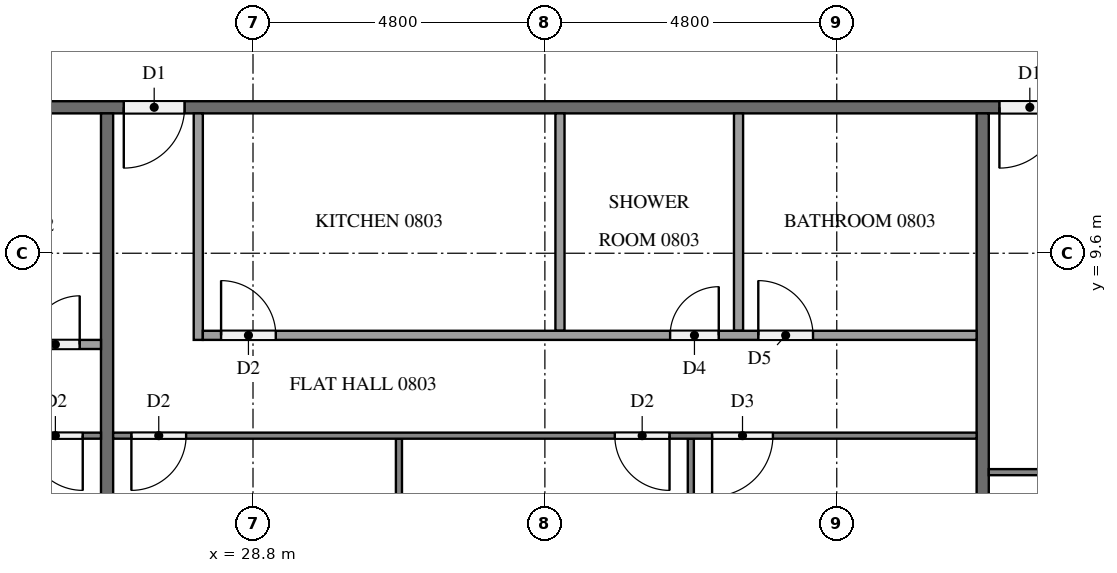
"""IFC4 building model, lengths in metres.
Left out: names, types, materials, properties, quantities, classifications, styles, units other than length and angle.
Written with IfcOpenShell. Run it as: python <this file> out.ifc"""

import sys

from ifc_helpers import new_model, si_unit, direction, frame, frame_2d, origin, place, context, subcontext, project, spatial, rectangle, extrude, element, fill, save


model = new_model("IFC4")
c1 = context("Model", 3, precision=1e-05, world=origin(), true_north=direction((0.0, 1.0)))
c2 = subcontext(c1, "Body", "Model", "MODEL_VIEW")
j1 = project(units=[si_unit("LENGTHUNIT", "METRE"), si_unit("PLANEANGLEUNIT", "RADIAN")], contexts=[c1])
p1 = place(None, origin())
s1 = spatial("IfcSite", under=j1, at=p1, CompositionType="ELEMENT")
p2 = place(p1, origin())
s2 = spatial("IfcBuilding", under=s1, at=p2, CompositionType="ELEMENT")
p3 = place(p2, frame((0.0, 0.0, 36.4)))
s3 = spatial("IfcBuildingStorey", under=s2, at=p3, CompositionType="ELEMENT", Elevation=36.4)
p4 = place(p3, frame((50.5, 12.0, 0.0), z_axis=(0.0, 0.0, 1.0), x_axis=(-1.0, 0.0, 0.0)))
e1 = element("IfcWall", 1, at=p4, inside=s3, PredefinedType="PARTITIONING", context=c2, shape_type="SweptSolid", body=[
    extrude(rectangle(XDim=38.6, YDim=0.2, at=frame_2d((19.3, 0.0))), origin(), (0.0, 0.0, 1.0), 3.2),
])
p5 = place(p4, frame((36.375, 0.0, 0.0)))
e2 = element("IfcOpeningElement", 2, at=p5, cuts=e1, PredefinedType="OPENING", context=c2, shape_type="SweptSolid", body=[
    extrude(rectangle(XDim=1.0, YDim=2.1, at=frame_2d((0.5, 1.05))), frame((0.0, 0.11, 0.0), z_axis=(0.0, -1.0, 0.0), x_axis=(1.0, 0.0, 0.0)), (0.0, 0.0, 1.0), 0.22),
])
p6 = place(p4, frame((34.825, 0.0, 0.0)))
e3 = element("IfcOpeningElement", 3, at=p6, cuts=e1, PredefinedType="OPENING", context=c2, shape_type="SweptSolid", body=[
    extrude(rectangle(XDim=1.0, YDim=2.1, at=frame_2d((0.5, 1.05))), frame((0.0, 0.11, 0.0), z_axis=(0.0, -1.0, 0.0), x_axis=(1.0, 0.0, 0.0)), (0.0, 0.0, 1.0), 0.22),
])
p7 = place(p4, frame((22.825, 0.0, 0.0)))
e4 = element("IfcOpeningElement", 4, at=p7, cuts=e1, PredefinedType="OPENING", context=c2, shape_type="SweptSolid", body=[
    extrude(rectangle(XDim=1.0, YDim=2.1, at=frame_2d((0.5, 1.05))), frame((0.0, 0.11, 0.0), z_axis=(0.0, -1.0, 0.0), x_axis=(1.0, 0.0, 0.0)), (0.0, 0.0, 1.0), 0.22),
])
p8 = place(p4, frame((8.425, 0.0, 0.0)))
e5 = element("IfcOpeningElement", 5, at=p8, cuts=e1, PredefinedType="OPENING", context=c2, shape_type="SweptSolid", body=[
    extrude(rectangle(XDim=1.0, YDim=2.1, at=frame_2d((0.5, 1.05))), frame((0.0, 0.11, 0.0), z_axis=(0.0, -1.0, 0.0), x_axis=(1.0, 0.0, 0.0)), (0.0, 0.0, 1.0), 0.22),
])
p9 = place(p4, frame((1.225, 0.0, 0.0)))
e6 = element("IfcOpeningElement", 6, at=p9, cuts=e1, PredefinedType="OPENING", context=c2, shape_type="SweptSolid", body=[
    extrude(rectangle(XDim=1.0, YDim=2.1, at=frame_2d((0.5, 1.05))), frame((0.0, 0.11, 0.0), z_axis=(0.0, -1.0, 0.0), x_axis=(1.0, 0.0, 0.0)), (0.0, 0.0, 1.0), 0.22),
])
for number, where, z_axis, x_axis in (
    (7, (26.4, 11.9, 0.0), (0.0, 0.0, 1.0), (0.0, -1.0, 0.0)),
    (8, (40.8, 11.9, 0.0), (0.0, 0.0, 1.0), (0.0, -1.0, 0.0)),
):
    element("IfcWall", number, at=place(p3, frame(where, z_axis=z_axis, x_axis=x_axis)), inside=s3, PredefinedType="PARTITIONING", context=c2, shape_type="SweptSolid", body=[
        extrude(rectangle(XDim=11.8, YDim=0.2, at=frame_2d((5.9, 0.0))), origin(), (0.0, 0.0, 1.0), 3.2),
    ])
p10 = place(p3, frame((26.3, 6.6, 0.0), z_axis=(0.0, 0.0, 1.0), x_axis=(-1.0, 0.0, 0.0)))
e9 = element("IfcWall", 9, at=p10, inside=s3, PredefinedType="PARTITIONING", context=c2, shape_type="SweptSolid", body=[
    extrude(rectangle(XDim=11.8, YDim=0.1, at=frame_2d((5.9, 0.0))), origin(), (0.0, 0.0, 1.0), 3.2),
])
p11 = place(p10, frame((10.5, 0.0, 0.0)))
e10 = element("IfcOpeningElement", 10, at=p11, cuts=e9, PredefinedType="OPENING", context=c2, shape_type="SweptSolid", body=[
    extrude(rectangle(XDim=1.0, YDim=2.1, at=frame_2d((0.5, 1.05))), frame((0.0, 0.06, 0.0), z_axis=(0.0, -1.0, 0.0), x_axis=(1.0, 0.0, 0.0)), (0.0, 0.0, 1.0), 0.12),
])
p12 = place(p10, frame((0.3, 0.0, 0.0)))
e11 = element("IfcOpeningElement", 11, at=p12, cuts=e9, PredefinedType="OPENING", context=c2, shape_type="SweptSolid", body=[
    extrude(rectangle(XDim=0.9, YDim=2.1, at=frame_2d((0.45, 1.05))), frame((0.0, 0.06, 0.0), z_axis=(0.0, -1.0, 0.0), x_axis=(1.0, 0.0, 0.0)), (0.0, 0.0, 1.0), 0.12),
])
p13 = place(p3, frame((15.975, 8.1, 0.0), z_axis=(0.0, 0.0, 1.0), x_axis=(1.0, 0.0, 0.0)))
e12 = element("IfcWall", 12, at=p13, inside=s3, PredefinedType="PARTITIONING", context=c2, shape_type="SweptSolid", body=[
    extrude(rectangle(XDim=10.325, YDim=0.15, at=frame_2d((5.163, 0.0))), origin(), (0.0, 0.0, 1.0), 3.2),
])
p14 = place(p13, frame((0.3, 0.0, 0.0)))
e13 = element("IfcOpeningElement", 13, at=p14, cuts=e12, PredefinedType="OPENING", context=c2, shape_type="SweptSolid", body=[
    extrude(rectangle(XDim=0.9, YDim=2.1, at=frame_2d((0.45, 1.05))), frame((0.0, 0.085, 0.0), z_axis=(0.0, -1.0, 0.0), x_axis=(1.0, 0.0, 0.0)), (0.0, 0.0, 1.0), 0.17),
])
p15 = place(p13, frame((9.175, 0.0, 0.0)))
e14 = element("IfcOpeningElement", 14, at=p15, cuts=e12, PredefinedType="OPENING", context=c2, shape_type="SweptSolid", body=[
    extrude(rectangle(XDim=0.8, YDim=2.1, at=frame_2d((0.4, 1.05))), frame((0.0, 0.085, 0.0), z_axis=(0.0, -1.0, 0.0), x_axis=(1.0, 0.0, 0.0)), (0.0, 0.0, 1.0), 0.17),
])
for number, where, z_axis, x_axis in (
    (15, (31.2, 6.55, 0.0), (0.0, 0.0, 1.0), (0.0, -1.0, 0.0)),
    (16, (36.0, 6.55, 0.0), (0.0, 0.0, 1.0), (0.0, -1.0, 0.0)),
):
    element("IfcWall", number, at=place(p3, frame(where, z_axis=z_axis, x_axis=x_axis)), inside=s3, PredefinedType="PARTITIONING", context=c2, shape_type="SweptSolid", body=[
        extrude(rectangle(XDim=6.45, YDim=0.1, at=frame_2d((3.225, 0.0))), origin(), (0.0, 0.0, 1.0), 3.2),
    ])
p16 = place(p3, frame((40.7, 6.6, 0.0), z_axis=(0.0, 0.0, 1.0), x_axis=(-1.0, 0.0, 0.0)))
e17 = element("IfcWall", 17, at=p16, inside=s3, PredefinedType="PARTITIONING", context=c2, shape_type="SweptSolid", body=[
    extrude(rectangle(XDim=14.2, YDim=0.1, at=frame_2d((7.1, 0.0))), origin(), (0.0, 0.0, 1.0), 3.2),
])
p17 = place(p16, frame((13.0, 0.0, 0.0)))
e18 = element("IfcOpeningElement", 18, at=p17, cuts=e17, PredefinedType="OPENING", context=c2, shape_type="SweptSolid", body=[
    extrude(rectangle(XDim=0.9, YDim=2.1, at=frame_2d((0.45, 1.05))), frame((0.0, 0.06, 0.0), z_axis=(0.0, -1.0, 0.0), x_axis=(1.0, 0.0, 0.0)), (0.0, 0.0, 1.0), 0.12),
])
p18 = place(p16, frame((5.05, 0.0, 0.0)))
e19 = element("IfcOpeningElement", 19, at=p18, cuts=e17, PredefinedType="OPENING", context=c2, shape_type="SweptSolid", body=[
    extrude(rectangle(XDim=0.9, YDim=2.1, at=frame_2d((0.45, 1.05))), frame((0.0, 0.06, 0.0), z_axis=(0.0, -1.0, 0.0), x_axis=(1.0, 0.0, 0.0)), (0.0, 0.0, 1.0), 0.12),
])
p19 = place(p16, frame((3.35, 0.0, 0.0)))
e20 = element("IfcOpeningElement", 20, at=p19, cuts=e17, PredefinedType="OPENING", context=c2, shape_type="SweptSolid", body=[
    extrude(rectangle(XDim=1.0, YDim=2.1, at=frame_2d((0.5, 1.05))), frame((0.0, 0.06, 0.0), z_axis=(0.0, -1.0, 0.0), x_axis=(1.0, 0.0, 0.0)), (0.0, 0.0, 1.0), 0.12),
])
for number, where, z_axis, x_axis in (
    (21, (33.848, 11.9, 0.0), (0.0, 0.0, 1.0), (0.0, -1.0, 0.0)),
    (22, (36.785, 11.9, 0.0), (0.0, 0.0, 1.0), (0.0, -1.0, 0.0)),
):
    element("IfcWall", number, at=place(p3, frame(where, z_axis=z_axis, x_axis=x_axis)), inside=s3, PredefinedType="PARTITIONING", context=c2, shape_type="SweptSolid", body=[
        extrude(rectangle(XDim=3.575, YDim=0.15, at=frame_2d((1.788, 0.0))), origin(), (0.0, 0.0, 1.0), 3.2),
    ])
p20 = place(p3, frame((27.9, 11.9, 0.0), z_axis=(0.0, 0.0, 1.0), x_axis=(0.0, -1.0, 0.0)))
e23 = element("IfcWall", 23, at=p20, inside=s3, PredefinedType="PARTITIONING", context=c2, shape_type="SweptSolid", body=[
    extrude(rectangle(XDim=3.725, YDim=0.15, at=frame_2d((1.862, 0.0))), origin(), (0.0, 0.0, 1.0), 3.2),
])
p21 = place(p3, frame((27.975, 8.25, 0.0), z_axis=(0.0, 0.0, 1.0), x_axis=(1.0, 0.0, 0.0)))
e24 = element("IfcWall", 24, at=p21, inside=s3, PredefinedType="PARTITIONING", context=c2, shape_type="SweptSolid", body=[
    extrude(rectangle(XDim=12.725, YDim=0.15, at=frame_2d((6.362, 0.0))), origin(), (0.0, 0.0, 1.0), 3.2),
])
p22 = place(p21, frame((0.3, 0.0, 0.0)))
e25 = element("IfcOpeningElement", 25, at=p22, cuts=e24, PredefinedType="OPENING", context=c2, shape_type="SweptSolid", body=[
    extrude(rectangle(XDim=0.9, YDim=2.1, at=frame_2d((0.45, 1.05))), frame((0.0, 0.085, 0.0), z_axis=(0.0, -1.0, 0.0), x_axis=(1.0, 0.0, 0.0)), (0.0, 0.0, 1.0), 0.17),
])
p23 = place(p21, frame((7.685, 0.0, 0.0)))
e26 = element("IfcOpeningElement", 26, at=p23, cuts=e24, PredefinedType="OPENING", context=c2, shape_type="SweptSolid", body=[
    extrude(rectangle(XDim=0.8, YDim=2.1, at=frame_2d((0.4, 1.05))), frame((0.0, 0.085, 0.0), z_axis=(0.0, -1.0, 0.0), x_axis=(1.0, 0.0, 0.0)), (0.0, 0.0, 1.0), 0.17),
])
p24 = place(p21, frame((9.135, 0.0, 0.0)))
e27 = element("IfcOpeningElement", 27, at=p24, cuts=e24, PredefinedType="OPENING", context=c2, shape_type="SweptSolid", body=[
    extrude(rectangle(XDim=0.9, YDim=2.1, at=frame_2d((0.45, 1.05))), frame((0.0, 0.085, 0.0), z_axis=(0.0, -1.0, 0.0), x_axis=(1.0, 0.0, 0.0)), (0.0, 0.0, 1.0), 0.17),
])
p25 = place(p3, frame((47.9, 6.0, 0.0), z_axis=(0.0, 0.0, 1.0), x_axis=(-1.0, 0.0, 0.0)))
e28 = element("IfcWall", 28, at=p25, inside=s3, PredefinedType="PARTITIONING", context=c2, shape_type="SweptSolid", body=[
    extrude(rectangle(XDim=7.0, YDim=0.1, at=frame_2d((3.5, 0.0))), origin(), (0.0, 0.0, 1.0), 3.2),
])
p26 = place(p25, frame((0.3, 0.0, 0.0)))
e29 = element("IfcOpeningElement", 29, at=p26, cuts=e28, PredefinedType="OPENING", context=c2, shape_type="SweptSolid", body=[
    extrude(rectangle(XDim=1.0, YDim=2.1, at=frame_2d((0.5, 1.05))), frame((0.0, 0.06, 0.0), z_axis=(0.0, -1.0, 0.0), x_axis=(1.0, 0.0, 0.0)), (0.0, 0.0, 1.0), 0.12),
])
p27 = place(p7, origin())
e30 = element("IfcDoor", 30, at=p27, inside=s3, OperationType="SINGLE_SWING_RIGHT", PredefinedType="DOOR", context=c2, shape_type="SweptSolid", body=[
    extrude(rectangle(XDim=1.0, YDim=2.1, at=frame_2d((0.5, 1.05))), frame((0.0, 0.025, 0.0), z_axis=(0.0, -1.0, 0.0), x_axis=(1.0, 0.0, 0.0)), (0.0, 0.0, 1.0), 0.05),
])
fill(e4, e30)
p28 = place(p8, origin())
e31 = element("IfcDoor", 31, at=p28, inside=s3, OperationType="SINGLE_SWING_RIGHT", PredefinedType="DOOR", context=c2, shape_type="SweptSolid", body=[
    extrude(rectangle(XDim=1.0, YDim=2.1, at=frame_2d((0.5, 1.05))), frame((0.0, 0.025, 0.0), z_axis=(0.0, -1.0, 0.0), x_axis=(1.0, 0.0, 0.0)), (0.0, 0.0, 1.0), 0.05),
])
fill(e5, e31)
p29 = place(p12, origin())
e32 = element("IfcDoor", 32, at=p29, inside=s3, OperationType="SINGLE_SWING_LEFT", PredefinedType="DOOR", context=c2, shape_type="SweptSolid", body=[
    extrude(rectangle(XDim=0.9, YDim=2.1, at=frame_2d((0.45, 1.05))), frame((0.0, 0.025, 0.0), z_axis=(0.0, -1.0, 0.0), x_axis=(1.0, 0.0, 0.0)), (0.0, 0.0, 1.0), 0.05),
])
fill(e11, e32)
p30 = place(p15, origin())
e33 = element("IfcDoor", 33, at=p30, inside=s3, OperationType="SINGLE_SWING_RIGHT", PredefinedType="DOOR", context=c2, shape_type="SweptSolid", body=[
    extrude(rectangle(XDim=0.8, YDim=2.1, at=frame_2d((0.4, 1.05))), frame((0.0, 0.025, 0.0), z_axis=(0.0, -1.0, 0.0), x_axis=(1.0, 0.0, 0.0)), (0.0, 0.0, 1.0), 0.05),
])
fill(e14, e33)
p31 = place(p17, origin())
e34 = element("IfcDoor", 34, at=p31, inside=s3, OperationType="SINGLE_SWING_RIGHT", PredefinedType="DOOR", context=c2, shape_type="SweptSolid", body=[
    extrude(rectangle(XDim=0.9, YDim=2.1, at=frame_2d((0.45, 1.05))), frame((0.0, 0.025, 0.0), z_axis=(0.0, -1.0, 0.0), x_axis=(1.0, 0.0, 0.0)), (0.0, 0.0, 1.0), 0.05),
])
fill(e18, e34)
p32 = place(p18, origin())
e35 = element("IfcDoor", 35, at=p32, inside=s3, OperationType="SINGLE_SWING_LEFT", PredefinedType="DOOR", context=c2, shape_type="SweptSolid", body=[
    extrude(rectangle(XDim=0.9, YDim=2.1, at=frame_2d((0.45, 1.05))), frame((0.0, 0.025, 0.0), z_axis=(0.0, -1.0, 0.0), x_axis=(1.0, 0.0, 0.0)), (0.0, 0.0, 1.0), 0.05),
])
fill(e19, e35)
p33 = place(p19, origin())
e36 = element("IfcDoor", 36, at=p33, inside=s3, OperationType="SINGLE_SWING_RIGHT", PredefinedType="DOOR", context=c2, shape_type="SweptSolid", body=[
    extrude(rectangle(XDim=1.0, YDim=2.1, at=frame_2d((0.5, 1.05))), frame((0.0, 0.025, 0.0), z_axis=(0.0, -1.0, 0.0), x_axis=(1.0, 0.0, 0.0)), (0.0, 0.0, 1.0), 0.05),
])
fill(e20, e36)
p34 = place(p22, origin())
e37 = element("IfcDoor", 37, at=p34, inside=s3, OperationType="SINGLE_SWING_LEFT", PredefinedType="DOOR", context=c2, shape_type="SweptSolid", body=[
    extrude(rectangle(XDim=0.9, YDim=2.1, at=frame_2d((0.45, 1.05))), frame((0.0, 0.025, 0.0), z_axis=(0.0, -1.0, 0.0), x_axis=(1.0, 0.0, 0.0)), (0.0, 0.0, 1.0), 0.05),
])
fill(e25, e37)
p35 = place(p23, origin())
e38 = element("IfcDoor", 38, at=p35, inside=s3, OperationType="SINGLE_SWING_RIGHT", PredefinedType="DOOR", context=c2, shape_type="SweptSolid", body=[
    extrude(rectangle(XDim=0.8, YDim=2.1, at=frame_2d((0.4, 1.05))), frame((0.0, 0.025, 0.0), z_axis=(0.0, -1.0, 0.0), x_axis=(1.0, 0.0, 0.0)), (0.0, 0.0, 1.0), 0.05),
])
fill(e26, e38)
p36 = place(p24, origin())
e39 = element("IfcDoor", 39, at=p36, inside=s3, OperationType="SINGLE_SWING_LEFT", PredefinedType="DOOR", context=c2, shape_type="SweptSolid", body=[
    extrude(rectangle(XDim=0.9, YDim=2.1, at=frame_2d((0.45, 1.05))), frame((0.0, 0.025, 0.0), z_axis=(0.0, -1.0, 0.0), x_axis=(1.0, 0.0, 0.0)), (0.0, 0.0, 1.0), 0.05),
])
fill(e27, e39)
save(model, sys.argv[1])
